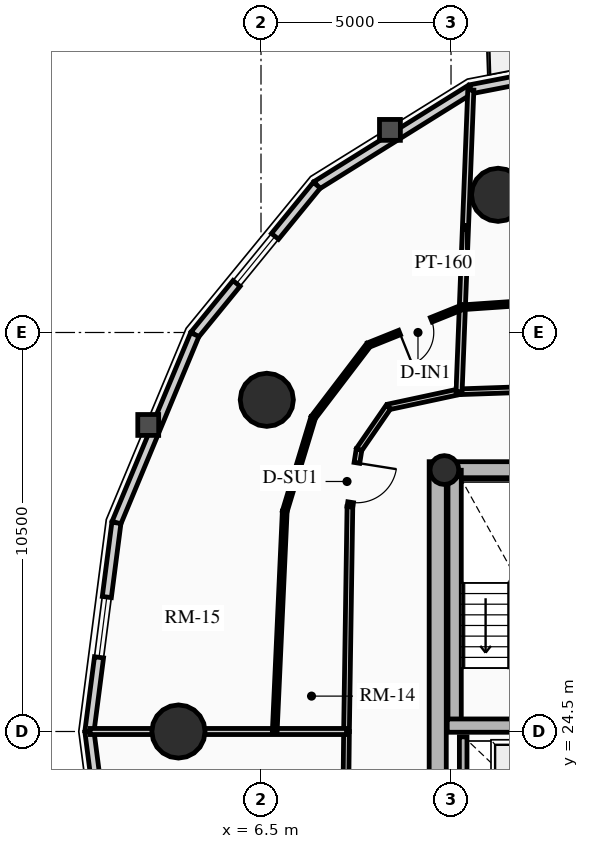
"""IFC4 building model, lengths in metres.
Left out: names, types, materials, properties, quantities, classifications, styles, units other than length and angle.
Written with IfcOpenShell. Run it as: python <this file> out.ifc"""

import sys

from ifc_helpers import new_model, si_unit, direction, frame, frame_2d, origin, origin_2d, place, context, subcontext, project, spatial, rectangle, circle, hollow_circle, extrude, source, transform, mapped, element, fill, save


model = new_model("IFC4")
c1 = context("Model", 3, precision=1e-05, world=origin(), true_north=direction((0.0, 1.0)))
c2 = subcontext(c1, "Body", "Model", "MODEL_VIEW")
j1 = project(units=[si_unit("LENGTHUNIT", "METRE"), si_unit("PLANEANGLEUNIT", "RADIAN")], contexts=[c1])
p1 = place(None, origin())
s1 = spatial("IfcSite", under=j1, at=p1, CompositionType="ELEMENT")
p2 = place(p1, origin())
s2 = spatial("IfcBuilding", under=s1, at=p2, CompositionType="ELEMENT")
p3 = place(p2, frame((0.0, 0.0, 144.04)))
s3 = spatial("IfcBuildingStorey", under=s2, at=p3, CompositionType="ELEMENT", Elevation=144.04)
p4 = place(p3, frame((11.15, 17.4, 0.0), z_axis=(0.0, 0.0, 1.0), x_axis=(0.0, 1.0, 0.0)))
e1 = element("IfcWall", 1, at=p4, inside=s3, PredefinedType="SHEAR", context=c2, shape_type="SweptSolid", body=[
    extrude(rectangle(XDim=14.2, YDim=0.45, at=frame_2d((7.1, 0.0))), origin(), (0.0, 0.0, 1.0), 3.06),
])
p5 = place(p3, frame((11.15, 31.375, 0.0), z_axis=(0.0, 0.0, 1.0), x_axis=(1.0, 0.0, 0.0)))
e2 = element("IfcWall", 2, at=p5, inside=s3, PredefinedType="SHEAR", context=c2, shape_type="SweptSolid", body=[
    extrude(rectangle(XDim=10.7, YDim=0.45, at=frame_2d((5.35, 0.0))), origin(), (0.0, 0.0, 1.0), 3.06),
])
m1 = source(origin(), c2, "Body", "SweptSolid", [
    extrude(rectangle(XDim=1.5, YDim=2.02, at=frame_2d((0.75, 1.01))), frame((0.0, 0.235, 0.0), z_axis=(0.0, -1.0, 0.0), x_axis=(1.0, 0.0, 0.0)), (0.0, 0.0, 1.0), 0.47),
])
p6 = place(p5, frame((4.6, 0.0, 0.0)))
e3 = element("IfcOpeningElement", 3, at=p6, cuts=e2, PredefinedType="OPENING", context=c2, shape_type="MappedRepresentation", body=[
    mapped(m1, transform((0.0, 0.0, 0.0), x_axis=(1.0, 0.0, 0.0), y_axis=(0.0, 1.0, 0.0), z_axis=(0.0, 0.0, 1.0), scale=1.0)),
])
p7 = place(p3, frame((11.595, 24.655, 0.0), z_axis=(0.0, 0.0, 1.0), x_axis=(0.0, 1.0, 0.0)))
e4 = element("IfcWall", 4, at=p7, inside=s3, PredefinedType="SHEAR", context=c2, shape_type="SweptSolid", body=[
    extrude(rectangle(XDim=6.72, YDim=0.35, at=frame_2d((3.36, 0.0))), origin(), (0.0, 0.0, 1.0), 3.06),
])
p8 = place(p3, frame((11.4, 24.655, 0.0), z_axis=(0.0, 0.0, 1.0), x_axis=(1.0, 0.0, 0.0)))
e5 = element("IfcWall", 5, at=p8, inside=s3, PredefinedType="SHEAR", context=c2, shape_type="SweptSolid", body=[
    extrude(rectangle(XDim=3.285, YDim=0.35, at=frame_2d((1.643, 0.0))), origin(), (0.0, 0.0, 1.0), 3.06),
])
p9 = place(p3, frame((11.325, 31.38, 0.0), z_axis=(0.0, 0.0, 1.0), x_axis=(1.0, 0.0, 0.0)))
e6 = element("IfcColumn", 6, at=p9, inside=s3, PredefinedType="COLUMN", context=c2, shape_type="SweptSolid", body=[
    extrude(hollow_circle(Radius=0.38, WallThickness=0.032, at=origin_2d()), origin(), (0.0, 0.0, 1.0), 3.06),
])
for number, where, z_axis, x_axis in (
    (7, (12.739, 38.623, 0.0), (0.0, 0.0, 1.0), (1.0, 0.0, 0.0)),
    (8, (6.653, 33.229, 0.0), (0.0, 0.0, 1.0), (1.0, 0.0, 0.0)),
    (9, (4.328, 24.5, 0.0), (0.0, 0.0, 1.0), (1.0, 0.0, 0.0)),
):
    element("IfcColumn", number, at=place(p3, frame(where, z_axis=z_axis, x_axis=x_axis)), inside=s3, PredefinedType="USERDEFINED", context=c2, shape_type="SweptSolid", body=[
        extrude(circle(Radius=0.7, at=origin_2d()), origin(), (0.0, 0.0, 1.0), 3.06),
    ])
p10 = place(p3, frame((12.015, 41.4, 0.0), z_axis=(0.0, 0.0, 1.0), x_axis=(0.981718699963, 0.190337579429, 0.0)))
e10 = element("IfcWall", 10, at=p10, inside=s3, PredefinedType="SOLIDWALL", context=c2, shape_type="SweptSolid", body=[
    extrude(rectangle(XDim=4.569, YDim=0.24, at=frame_2d((2.284, 0.0))), origin(), (0.0, 0.0, 1.0), 2.229),
])
m2 = source(origin(), c2, "Body", "SweptSolid", [
    extrude(rectangle(XDim=1.15, YDim=2.005, at=frame_2d((0.575, 1.002))), frame((0.0, 0.13, 0.0), z_axis=(0.0, -1.0, 0.0), x_axis=(1.0, 0.0, 0.0)), (0.0, 0.0, 1.0), 0.26),
])
p11 = place(p10, frame((1.709, 0.0, 0.0)))
e11 = element("IfcOpeningElement", 11, at=p11, cuts=e10, PredefinedType="OPENING", context=c2, shape_type="MappedRepresentation", body=[
    mapped(m2, transform((0.0, 0.0, 0.0), x_axis=(1.0, 0.0, 0.0), y_axis=(0.0, 1.0, 0.0), z_axis=(0.0, 0.0, 1.0), scale=1.0)),
])
p12 = place(p3, frame((7.968, 38.876, 0.0), z_axis=(0.0, 0.0, 1.0), x_axis=(0.848452391194, 0.529271707044, 0.0)))
e12 = element("IfcWall", 12, at=p12, inside=s3, PredefinedType="SOLIDWALL", context=c2, shape_type="SweptSolid", body=[
    extrude(rectangle(XDim=4.769, YDim=0.24, at=frame_2d((2.385, 0.0))), origin(), (0.0, 0.0, 1.0), 2.229),
])
p13 = place(p3, frame((4.757, 34.945, 0.0), z_axis=(0.0, 0.0, 1.0), x_axis=(0.632598524901, 0.774479894053, 0.0)))
e13 = element("IfcWall", 13, at=p13, inside=s3, PredefinedType="SOLIDWALL", context=c2, shape_type="SweptSolid", body=[
    extrude(rectangle(XDim=5.076, YDim=0.24, at=frame_2d((2.538, 0.0))), origin(), (0.0, 0.0, 1.0), 2.229),
])
m3 = source(origin(), c2, "Body", "SweptSolid", [
    extrude(rectangle(XDim=1.6, YDim=1.3, at=frame_2d((0.8, 0.65))), frame((0.0, 0.13, 0.0), z_axis=(0.0, -1.0, 0.0), x_axis=(1.0, 0.0, 0.0)), (0.0, 0.0, 1.0), 0.26),
])
p14 = place(p13, frame((1.738, 0.0, 0.65)))
e14 = element("IfcOpeningElement", 14, at=p14, cuts=e13, PredefinedType="OPENING", context=c2, shape_type="MappedRepresentation", body=[
    mapped(m3, transform((0.0, 0.0, 0.0), x_axis=(1.0, 0.0, 0.0), y_axis=(0.0, 1.0, 0.0), z_axis=(0.0, 0.0, 1.0), scale=1.0)),
])
p15 = place(p3, frame((2.695, 29.991, 0.0), z_axis=(0.0, 0.0, 1.0), x_axis=(0.384259959969, 0.923224936386, 0.0)))
e15 = element("IfcWall", 15, at=p15, inside=s3, PredefinedType="SOLIDWALL", context=c2, shape_type="SweptSolid", body=[
    extrude(rectangle(XDim=5.365, YDim=0.24, at=frame_2d((2.683, 0.0))), origin(), (0.0, 0.0, 1.0), 2.229),
])
p16 = place(p3, frame((1.985, 24.5, 0.0), z_axis=(0.0, 0.0, 1.0), x_axis=(0.128266533912, 0.991739732126, 0.0)))
e16 = element("IfcWall", 16, at=p16, inside=s3, PredefinedType="SOLIDWALL", context=c2, shape_type="SweptSolid", body=[
    extrude(rectangle(XDim=5.537, YDim=0.24, at=frame_2d((2.769, 0.0))), origin(), (0.0, 0.0, 1.0), 2.229),
])
p17 = place(p16, frame((1.968, 0.0, 0.65)))
e17 = element("IfcOpeningElement", 17, at=p17, cuts=e16, PredefinedType="OPENING", context=c2, shape_type="MappedRepresentation", body=[
    mapped(m3, transform((0.0, 0.0, 0.0), x_axis=(1.0, 0.0, 0.0), y_axis=(0.0, 1.0, 0.0), z_axis=(0.0, 0.0, 1.0), scale=1.0)),
])
p18 = place(p3, frame((2.695, 19.009, 0.0), z_axis=(0.0, 0.0, 1.0), x_axis=(-0.128266533912, 0.991739732126, 0.0)))
e18 = element("IfcWall", 18, at=p18, inside=s3, PredefinedType="SOLIDWALL", context=c2, shape_type="SweptSolid", body=[
    extrude(rectangle(XDim=5.537, YDim=0.24, at=frame_2d((2.769, 0.0))), origin(), (0.0, 0.0, 1.0), 2.229),
])
p19 = place(p3, frame((11.82, 21.92, 0.0), z_axis=(0.0, 0.0, 1.0), x_axis=(0.0, 1.0, 0.0)))
e19 = element("IfcWall", 19, at=p19, inside=s3, PredefinedType="SHEAR", context=c2, shape_type="SweptSolid", body=[
    extrude(rectangle(XDim=2.44, YDim=0.2, at=frame_2d((1.22, 0.0))), origin(), (0.0, 0.0, 1.0), 3.06),
])
p20 = place(p3, frame((18.112, 33.659, 0.0), z_axis=(0.0, 0.0, 1.0), x_axis=(-0.999413895918, -0.034232508622, 0.0)))
e20 = element("IfcWall", 20, at=p20, inside=s3, PredefinedType="PARTITIONING", context=c2, shape_type="SweptSolid", body=[
    extrude(rectangle(XDim=6.404, YDim=0.15, at=frame_2d((3.202, 0.0))), origin(), (0.0, 0.0, 1.0), 2.275),
])
p21 = place(p3, frame((11.712, 33.44, 0.0), z_axis=(0.0, 0.0, 1.0), x_axis=(-0.977753514213, -0.209757158265, 0.0)))
e21 = element("IfcWall", 21, at=p21, inside=s3, PredefinedType="PARTITIONING", context=c2, shape_type="SweptSolid", body=[
    extrude(rectangle(XDim=1.901, YDim=0.15, at=frame_2d((0.95, 0.0))), origin(), (0.0, 0.0, 1.0), 2.275),
])
p22 = place(p3, frame((9.853, 33.042, 0.0), z_axis=(0.0, 0.0, 1.0), x_axis=(-0.567189283521, -0.823587467522, 0.0)))
e22 = element("IfcWall", 22, at=p22, inside=s3, PredefinedType="PARTITIONING", context=c2, shape_type="SweptSolid", body=[
    extrude(rectangle(XDim=1.365, YDim=0.15, at=frame_2d((0.682, 0.0))), origin(), (0.0, 0.0, 1.0), 2.275),
])
p23 = place(p3, frame((9.079, 31.918, 0.0), z_axis=(0.0, 0.0, 1.0), x_axis=(-0.15742775293, -0.987530507178, 0.0)))
e23 = element("IfcWall", 23, at=p23, inside=s3, PredefinedType="PARTITIONING", context=c2, shape_type="SweptSolid", body=[
    extrude(rectangle(XDim=1.523, YDim=0.15, at=frame_2d((0.761, 0.0))), origin(), (0.0, 0.0, 1.0), 2.275),
])
m4 = source(origin(), c2, "Body", "SweptSolid", [
    extrude(rectangle(XDim=1.05, YDim=2.015, at=frame_2d((0.525, 1.007))), frame((0.0, 0.085, 0.0), z_axis=(0.0, -1.0, 0.0), x_axis=(1.0, 0.0, 0.0)), (0.0, 0.0, 1.0), 0.17),
])
p24 = place(p23, frame((0.353, 0.0, 0.0)))
e24 = element("IfcOpeningElement", 24, at=p24, cuts=e23, PredefinedType="OPENING", context=c2, shape_type="MappedRepresentation", body=[
    mapped(m4, transform((0.0, 0.0, 0.0), x_axis=(1.0, 0.0, 0.0), y_axis=(0.0, 1.0, 0.0), z_axis=(0.0, 0.0, 1.0), scale=1.0)),
])
p25 = place(p3, frame((8.84, 30.414, 0.0), z_axis=(0.0, 0.0, 1.0), x_axis=(-0.01514915101, -0.999885245027, 0.0)))
e25 = element("IfcWall", 25, at=p25, inside=s3, PredefinedType="PARTITIONING", context=c2, shape_type="SweptSolid", body=[
    extrude(rectangle(XDim=5.915, YDim=0.15, at=frame_2d((2.957, 0.0))), origin(), (0.0, 0.0, 1.0), 2.705),
])
p26 = place(p3, frame((8.75, 24.5, 0.0), z_axis=(0.0, 0.0, 1.0), x_axis=(-0.01076642715, -0.999942040344, 0.0)))
e26 = element("IfcWall", 26, at=p26, inside=s3, PredefinedType="PARTITIONING", context=c2, shape_type="SweptSolid", body=[
    extrude(rectangle(XDim=6.032, YDim=0.15, at=frame_2d((3.016, 0.0))), origin(), (0.0, 0.0, 1.0), 2.275),
])
p27 = place(p3, frame((11.712, 33.44, 0.0), z_axis=(0.0, 0.0, 1.0), x_axis=(0.038892064024, 0.999243417469, 0.0)))
e27 = element("IfcWall", 27, at=p27, inside=s3, PredefinedType="PARTITIONING", context=c2, shape_type="SweptSolid", body=[
    extrude(rectangle(XDim=7.947, YDim=0.16, at=frame_2d((3.974, 0.0))), origin(), (0.0, 0.0, 1.0), 2.229),
])
p28 = place(p3, frame((8.75, 24.5, 0.0), z_axis=(0.0, 0.0, 1.0), x_axis=(-1.0, 0.0, 0.0)))
e28 = element("IfcWall", 28, at=p28, inside=s3, PredefinedType="PARTITIONING", context=c2, shape_type="SweptSolid", body=[
    extrude(rectangle(XDim=6.745, YDim=0.16, at=frame_2d((3.373, 0.0))), origin(), (0.0, 0.0, 1.0), 2.229),
])
p29 = place(p3, frame((17.661, 36.065, 0.0), z_axis=(0.0, 0.0, 1.0), x_axis=(-0.997670473363, -0.068217494681, 0.0)))
e29 = element("IfcWall", 29, at=p29, inside=s3, PredefinedType="PARTITIONING", context=c2, shape_type="SweptSolid", body=[
    extrude(rectangle(XDim=5.876, YDim=0.125, at=frame_2d((2.938, 0.0))), origin(), (0.0, 0.0, 1.0), 2.275),
])
p30 = place(p3, frame((11.798, 35.664, 0.0), z_axis=(0.0, 0.0, 1.0), x_axis=(-0.927779230796, -0.37312960068, 0.0)))
e30 = element("IfcWall", 30, at=p30, inside=s3, PredefinedType="PARTITIONING", context=c2, shape_type="SweptSolid", body=[
    extrude(rectangle(XDim=2.662, YDim=0.125, at=frame_2d((1.331, 0.0))), origin(), (0.0, 0.0, 1.0), 2.275),
])
m5 = source(origin(), c2, "Body", "SweptSolid", [
    extrude(rectangle(XDim=0.9, YDim=2.005, at=frame_2d((0.45, 1.002))), frame((0.0, 0.073, 0.0), z_axis=(0.0, -1.0, 0.0), x_axis=(1.0, 0.0, 0.0)), (0.0, 0.0, 1.0), 0.145),
])
p31 = place(p30, frame((0.881, 0.0, 0.0)))
e31 = element("IfcOpeningElement", 31, at=p31, cuts=e30, PredefinedType="OPENING", context=c2, shape_type="MappedRepresentation", body=[
    mapped(m5, transform((0.0, 0.0, 0.0), x_axis=(1.0, 0.0, 0.0), y_axis=(0.0, 1.0, 0.0), z_axis=(0.0, 0.0, 1.0), scale=1.0)),
])
p32 = place(p3, frame((9.329, 34.671, 0.0), z_axis=(0.0, 0.0, 1.0), x_axis=(-0.606312904513, -0.795226170231, 0.0)))
e32 = element("IfcWall", 32, at=p32, inside=s3, PredefinedType="PARTITIONING", context=c2, shape_type="SweptSolid", body=[
    extrude(rectangle(XDim=2.4, YDim=0.125, at=frame_2d((1.2, 0.0))), origin(), (0.0, 0.0, 1.0), 2.275),
])
p33 = place(p3, frame((7.874, 32.762, 0.0), z_axis=(0.0, 0.0, 1.0), x_axis=(-0.290359355154, -0.956917679257, 0.0)))
e33 = element("IfcWall", 33, at=p33, inside=s3, PredefinedType="PARTITIONING", context=c2, shape_type="SweptSolid", body=[
    extrude(rectangle(XDim=2.58, YDim=0.125, at=frame_2d((1.29, 0.0))), origin(), (0.0, 0.0, 1.0), 2.275),
])
p34 = place(p3, frame((7.125, 30.294, 0.0), z_axis=(0.0, 0.0, 1.0), x_axis=(-0.045379018557, -0.998969841724, 0.0)))
e34 = element("IfcWall", 34, at=p34, inside=s3, PredefinedType="PARTITIONING", context=c2, shape_type="SweptSolid", body=[
    extrude(rectangle(XDim=5.8, YDim=0.125, at=frame_2d((2.9, 0.0))), origin(), (0.0, 0.0, 1.0), 2.705),
])
m6 = source(origin(), c2, "Body", "SweptSolid", [
    extrude(rectangle(XDim=1.6, YDim=1.3, at=frame_2d((0.8, 0.65))), frame((0.0, 0.03, 0.0), z_axis=(0.0, -1.0, 0.0), x_axis=(1.0, 0.0, 0.0)), (0.0, 0.0, 1.0), 0.06),
])
p35 = place(p14, origin())
e35 = element("IfcWindow", 35, at=p35, inside=s3, PartitioningType="SINGLE_PANEL", PredefinedType="WINDOW", context=c2, shape_type="MappedRepresentation", body=[
    mapped(m6, transform((0.0, 0.0, 0.0), x_axis=(1.0, 0.0, 0.0), y_axis=(0.0, 1.0, 0.0), z_axis=(0.0, 0.0, 1.0), scale=1.0)),
])
fill(e14, e35)
p36 = place(p17, origin())
e36 = element("IfcWindow", 36, at=p36, inside=s3, PartitioningType="SINGLE_PANEL", PredefinedType="WINDOW", context=c2, shape_type="MappedRepresentation", body=[
    mapped(m6, transform((0.0, 0.0, 0.0), x_axis=(1.0, 0.0, 0.0), y_axis=(0.0, 1.0, 0.0), z_axis=(0.0, 0.0, 1.0), scale=1.0)),
])
fill(e17, e36)
m7 = source(origin(), c2, "Body", "SweptSolid", [
    extrude(rectangle(XDim=1.05, YDim=2.015, at=frame_2d((0.525, 1.007))), frame((0.0, 0.025, 0.0), z_axis=(0.0, -1.0, 0.0), x_axis=(1.0, 0.0, 0.0)), (0.0, 0.0, 1.0), 0.05),
])
p37 = place(p24, origin())
e37 = element("IfcDoor", 37, at=p37, inside=s3, OperationType="SINGLE_SWING_LEFT", PredefinedType="DOOR", context=c2, shape_type="MappedRepresentation", body=[
    mapped(m7, transform((0.0, 0.0, 0.0), x_axis=(1.0, 0.0, 0.0), y_axis=(0.0, 1.0, 0.0), z_axis=(0.0, 0.0, 1.0), scale=1.0)),
])
fill(e24, e37)
m8 = source(origin(), c2, "Body", "SweptSolid", [
    extrude(rectangle(XDim=0.9, YDim=2.005, at=frame_2d((0.45, 1.002))), frame((0.0, 0.025, 0.0), z_axis=(0.0, -1.0, 0.0), x_axis=(1.0, 0.0, 0.0)), (0.0, 0.0, 1.0), 0.05),
])
p38 = place(p31, origin())
e38 = element("IfcDoor", 38, at=p38, inside=s3, OperationType="SINGLE_SWING_RIGHT", PredefinedType="DOOR", context=c2, shape_type="MappedRepresentation", body=[
    mapped(m8, transform((0.0, 0.0, 0.0), x_axis=(1.0, 0.0, 0.0), y_axis=(0.0, 1.0, 0.0), z_axis=(0.0, 0.0, 1.0), scale=1.0)),
])
fill(e31, e38)
save(model, sys.argv[1])
